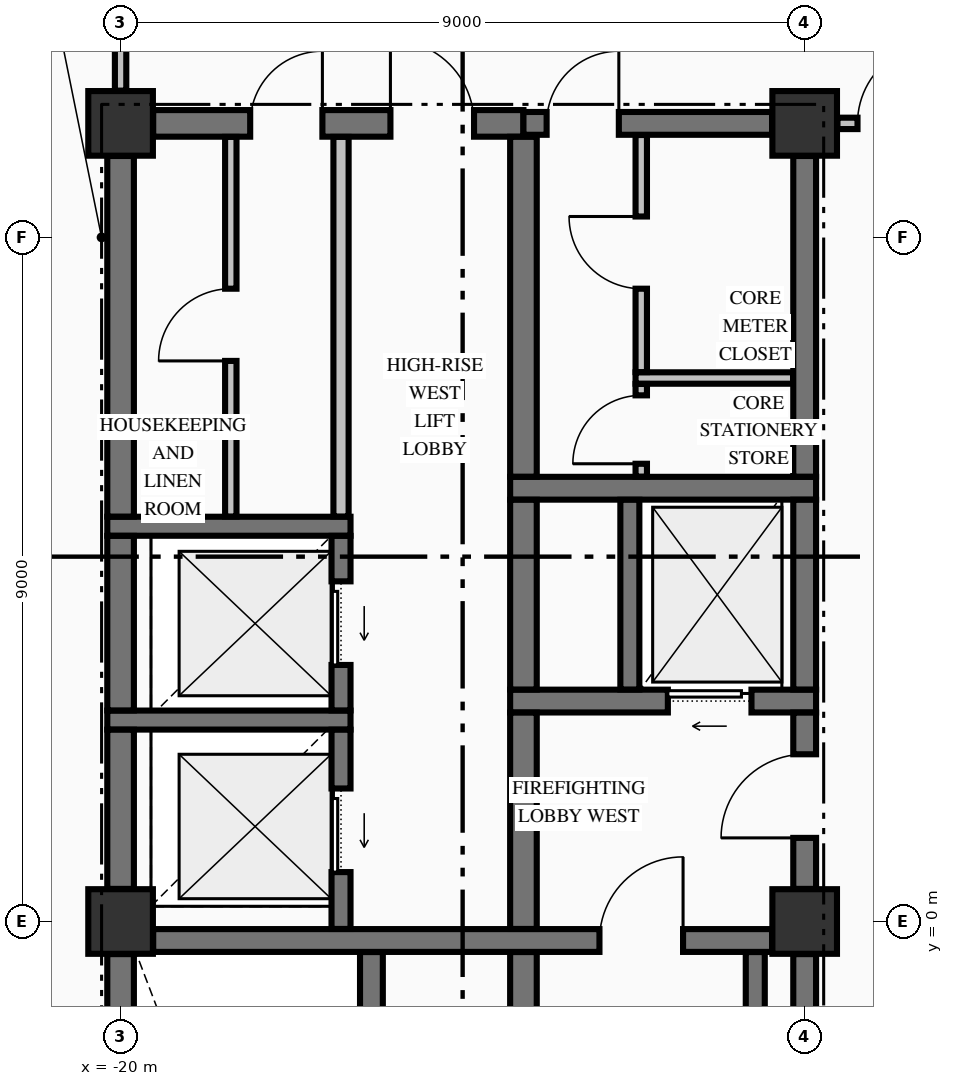
"""IFC4 building model, lengths in metres.
Left out: names, types, materials, properties, quantities, classifications, styles, units other than length and angle.
Written with IfcOpenShell. Run it as: python <this file> out.ifc"""

import sys

from ifc_helpers import new_model, si_unit, direction, frame, frame_2d, origin, origin_2d, place, context, subcontext, project, spatial, rectangle, extrude, element, fill, save


model = new_model("IFC4")
c1 = context("Model", 3, precision=1e-05, world=origin(), true_north=direction((0.0, 1.0)))
c2 = subcontext(c1, "Body", "Model", "MODEL_VIEW")
j1 = project(units=[si_unit("LENGTHUNIT", "METRE"), si_unit("PLANEANGLEUNIT", "RADIAN")], contexts=[c1])
p1 = place(None, origin())
s1 = spatial("IfcSite", under=j1, at=p1, CompositionType="ELEMENT")
p2 = place(p1, origin())
s2 = spatial("IfcBuilding", under=s1, at=p2, CompositionType="ELEMENT")
p3 = place(p2, frame((0.0, 0.0, 162.66)))
s3 = spatial("IfcBuildingStorey", under=s2, at=p3, CompositionType="ELEMENT", Elevation=162.66)
for number, where, z_axis, x_axis in (
    (1, (-20.0, 10.5, -0.25), (0.0, 0.0, 1.0), (1.0, 0.0, 0.0)),
    (2, (-11.0, 0.0, -0.25), (0.0, 0.0, 1.0), (1.0, 0.0, 0.0)),
    (3, (-11.0, 10.5, -0.25), (0.0, 0.0, 1.0), (1.0, 0.0, 0.0)),
    (4, (-20.0, 0.0, -0.25), (0.0, 0.0, 1.0), (1.0, 0.0, 0.0)),
):
    element("IfcColumn", number, at=place(p3, frame(where, z_axis=z_axis, x_axis=x_axis)), inside=s3, PredefinedType="COLUMN", context=c2, shape_type="SweptSolid", body=[
        extrude(rectangle(XDim=0.85, YDim=0.85, at=origin_2d()), origin(), (0.0, 0.0, 1.0), 3.4),
    ])
p4 = place(p3, frame((-19.571, -0.25, 0.0), z_axis=(0.0, 0.0, 1.0), x_axis=(1.0, 0.0, 0.0)))
e5 = element("IfcWall", 5, at=p4, inside=s3, PredefinedType="SHEAR", context=c2, shape_type="SweptSolid", body=[
    extrude(rectangle(XDim=8.142, YDim=0.3, at=frame_2d((4.071, 0.0))), origin(), (0.0, 0.0, 1.0), 3.15),
])
p5 = place(p4, frame((5.871, 0.0, 0.0)))
e6 = element("IfcOpeningElement", 6, at=p5, cuts=e5, PredefinedType="OPENING", context=c2, shape_type="SweptSolid", body=[
    extrude(rectangle(XDim=1.1, YDim=2.15, at=frame_2d((0.55, 1.075))), frame((0.0, 0.16, 0.0), z_axis=(0.0, -1.0, 0.0), x_axis=(1.0, 0.0, 0.0)), (0.0, 0.0, 1.0), 0.32),
])
p6 = place(p3, frame((-20.175, 2.65, 0.0), z_axis=(0.0, 0.0, 1.0), x_axis=(1.0, 0.0, 0.0)))
e7 = element("IfcWall", 7, at=p6, inside=s3, PredefinedType="SOLIDWALL", context=c2, shape_type="SweptSolid", body=[
    extrude(rectangle(XDim=3.2, YDim=0.25, at=frame_2d((1.6, 0.0))), origin(), (0.0, 0.0, 1.0), 3.15),
])
p7 = place(p3, frame((-14.875, 2.9, 0.0), z_axis=(0.0, 0.0, 1.0), x_axis=(1.0, 0.0, 0.0)))
e8 = element("IfcWall", 8, at=p7, inside=s3, PredefinedType="SHEAR", context=c2, shape_type="SweptSolid", body=[
    extrude(rectangle(XDim=4.025, YDim=0.3, at=frame_2d((2.012, 0.0))), origin(), (0.0, 0.0, 1.0), 3.15),
])
p8 = place(p7, frame((2.075, 0.0, 0.0)))
e9 = element("IfcOpeningElement", 9, at=p8, cuts=e8, PredefinedType="OPENING", context=c2, shape_type="SweptSolid", body=[
    extrude(rectangle(XDim=1.1, YDim=2.2, at=frame_2d((0.55, 1.1))), frame((0.0, 0.16, 0.0), z_axis=(0.0, -1.0, 0.0), x_axis=(1.0, 0.0, 0.0)), (0.0, 0.0, 1.0), 0.32),
])
p9 = place(p3, frame((-20.175, 5.2, 0.0), z_axis=(0.0, 0.0, 1.0), x_axis=(1.0, 0.0, 0.0)))
e10 = element("IfcWall", 10, at=p9, inside=s3, PredefinedType="SOLIDWALL", context=c2, shape_type="SweptSolid", body=[
    extrude(rectangle(XDim=3.2, YDim=0.25, at=frame_2d((1.6, 0.0))), origin(), (0.0, 0.0, 1.0), 3.15),
])
p10 = place(p3, frame((-14.875, 5.7, 0.0), z_axis=(0.0, 0.0, 1.0), x_axis=(1.0, 0.0, 0.0)))
e11 = element("IfcWall", 11, at=p10, inside=s3, PredefinedType="SHEAR", context=c2, shape_type="SweptSolid", body=[
    extrude(rectangle(XDim=4.025, YDim=0.3, at=frame_2d((2.012, 0.0))), origin(), (0.0, 0.0, 1.0), 3.15),
])
p11 = place(p3, frame((-19.571, 10.5, 0.0), z_axis=(0.0, 0.0, 1.0), x_axis=(1.0, 0.0, 0.0)))
e12 = element("IfcWall", 12, at=p11, inside=s3, PredefinedType="SHEAR", context=c2, shape_type="SweptSolid", body=[
    extrude(rectangle(XDim=4.871, YDim=0.35, at=frame_2d((2.436, 0.0))), origin(), (0.0, 0.0, 1.0), 3.15),
])
p12 = place(p11, frame((3.121, 0.0, 0.0)))
e13 = element("IfcOpeningElement", 13, at=p12, cuts=e12, PredefinedType="OPENING", context=c2, shape_type="SweptSolid", body=[
    extrude(rectangle(XDim=1.1, YDim=2.15, at=frame_2d((0.55, 1.075))), frame((0.0, 0.185, 0.0), z_axis=(0.0, -1.0, 0.0), x_axis=(1.0, 0.0, 0.0)), (0.0, 0.0, 1.0), 0.37),
])
p13 = place(p11, frame((1.276, 0.0, 0.0)))
e14 = element("IfcOpeningElement", 14, at=p13, cuts=e12, PredefinedType="OPENING", context=c2, shape_type="SweptSolid", body=[
    extrude(rectangle(XDim=0.95, YDim=2.15, at=frame_2d((0.475, 1.075))), frame((0.0, 0.185, 0.0), z_axis=(0.0, -1.0, 0.0), x_axis=(1.0, 0.0, 0.0)), (0.0, 0.0, 1.0), 0.37),
])
p14 = place(p3, frame((-14.7, 10.5, 0.0), z_axis=(0.0, 0.0, 1.0), x_axis=(1.0, 0.0, 0.0)))
e15 = element("IfcWall", 15, at=p14, inside=s3, PredefinedType="SHEAR", context=c2, shape_type="SweptSolid", body=[
    extrude(rectangle(XDim=3.271, YDim=0.3, at=frame_2d((1.635, 0.0))), origin(), (0.0, 0.0, 1.0), 3.15),
])
p15 = place(p14, frame((0.305, 0.0, 0.0)))
e16 = element("IfcOpeningElement", 16, at=p15, cuts=e15, PredefinedType="OPENING", context=c2, shape_type="SweptSolid", body=[
    extrude(rectangle(XDim=0.95, YDim=2.15, at=frame_2d((0.475, 1.075))), frame((0.0, 0.16, 0.0), z_axis=(0.0, -1.0, 0.0), x_axis=(1.0, 0.0, 0.0)), (0.0, 0.0, 1.0), 0.32),
])
p16 = place(p3, frame((-13.225, 7.15, 0.0), z_axis=(0.0, 0.0, 1.0), x_axis=(1.0, 0.0, 0.0)))
e17 = element("IfcWall", 17, at=p16, inside=s3, PredefinedType="PARTITIONING", context=c2, shape_type="SweptSolid", body=[
    extrude(rectangle(XDim=2.072, YDim=0.15, at=frame_2d((1.036, 0.0))), origin(), (0.0, 0.0, 1.0), 3.15),
])
p17 = place(p3, frame((-10.569, 10.5, 0.0), z_axis=(0.0, 0.0, 1.0), x_axis=(1.0, 0.0, 0.0)))
e18 = element("IfcWall", 18, at=p17, inside=s3, PredefinedType="PARTITIONING", context=c2, shape_type="SweptSolid", body=[
    extrude(rectangle(XDim=21.138, YDim=0.15, at=frame_2d((10.569, 0.0))), origin(), (0.0, 0.0, 1.0), 3.15),
])
p18 = place(p17, frame((0.264, 0.0, 0.0)))
e19 = element("IfcOpeningElement", 19, at=p18, cuts=e18, PredefinedType="OPENING", context=c2, shape_type="SweptSolid", body=[
    extrude(rectangle(XDim=1.05, YDim=2.15, at=frame_2d((0.525, 1.075))), frame((0.0, 0.085, 0.0), z_axis=(0.0, -1.0, 0.0), x_axis=(1.0, 0.0, 0.0)), (0.0, 0.0, 1.0), 0.17),
])
p19 = place(p17, frame((19.824, 0.0, 0.0)))
e20 = element("IfcOpeningElement", 20, at=p19, cuts=e18, PredefinedType="OPENING", context=c2, shape_type="SweptSolid", body=[
    extrude(rectangle(XDim=1.05, YDim=2.15, at=frame_2d((0.525, 1.075))), frame((0.0, 0.085, 0.0), z_axis=(0.0, -1.0, 0.0), x_axis=(1.0, 0.0, 0.0)), (0.0, 0.0, 1.0), 0.17),
])
p20 = place(p3, frame((-20.0, -9.521, 0.0), z_axis=(0.0, 0.0, 1.0), x_axis=(0.0, 1.0, 0.0)))
e21 = element("IfcWall", 21, at=p20, inside=s3, PredefinedType="SHEAR", context=c2, shape_type="SweptSolid", body=[
    extrude(rectangle(XDim=9.092, YDim=0.35, at=frame_2d((4.546, 0.0))), origin(), (0.0, 0.0, 1.0), 3.15),
])
p21 = place(p3, frame((-20.0, 0.429, 0.0), z_axis=(0.0, 0.0, 1.0), x_axis=(0.0, 1.0, 0.0)))
e22 = element("IfcWall", 22, at=p21, inside=s3, PredefinedType="SHEAR", context=c2, shape_type="SweptSolid", body=[
    extrude(rectangle(XDim=2.094, YDim=0.35, at=frame_2d((1.047, 0.0))), origin(), (0.0, 0.0, 1.0), 3.15),
])
p22 = place(p3, frame((-20.0, 2.777, 0.0), z_axis=(0.0, 0.0, 1.0), x_axis=(0.0, 1.0, 0.0)))
e23 = element("IfcWall", 23, at=p22, inside=s3, PredefinedType="SHEAR", context=c2, shape_type="SweptSolid", body=[
    extrude(rectangle(XDim=2.296, YDim=0.35, at=frame_2d((1.148, 0.0))), origin(), (0.0, 0.0, 1.0), 3.15),
])
p23 = place(p3, frame((-20.0, 5.327, 0.0), z_axis=(0.0, 0.0, 1.0), x_axis=(0.0, 1.0, 0.0)))
e24 = element("IfcWall", 24, at=p23, inside=s3, PredefinedType="SHEAR", context=c2, shape_type="SweptSolid", body=[
    extrude(rectangle(XDim=4.744, YDim=0.35, at=frame_2d((2.372, 0.0))), origin(), (0.0, 0.0, 1.0), 3.15),
])
p24 = place(p3, frame((-17.1, -0.098, 0.0), z_axis=(0.0, 0.0, 1.0), x_axis=(0.0, 1.0, 0.0)))
e25 = element("IfcWall", 25, at=p24, inside=s3, PredefinedType="SOLIDWALL", context=c2, shape_type="SweptSolid", body=[
    extrude(rectangle(XDim=2.621, YDim=0.25, at=frame_2d((1.311, 0.0))), origin(), (0.0, 0.0, 1.0), 3.15),
])
p25 = place(p24, frame((0.748, 0.0, 0.0)))
e26 = element("IfcOpeningElement", 26, at=p25, cuts=e25, PredefinedType="OPENING", context=c2, shape_type="SweptSolid", body=[
    extrude(rectangle(XDim=1.1, YDim=2.2, at=frame_2d((0.55, 1.1))), frame((0.0, 0.135, 0.0), z_axis=(0.0, -1.0, 0.0), x_axis=(1.0, 0.0, 0.0)), (0.0, 0.0, 1.0), 0.27),
])
p26 = place(p3, frame((-17.1, 2.777, 0.0), z_axis=(0.0, 0.0, 1.0), x_axis=(0.0, 1.0, 0.0)))
e27 = element("IfcWall", 27, at=p26, inside=s3, PredefinedType="SOLIDWALL", context=c2, shape_type="SweptSolid", body=[
    extrude(rectangle(XDim=2.296, YDim=0.25, at=frame_2d((1.148, 0.0))), origin(), (0.0, 0.0, 1.0), 3.15),
])
p27 = place(p26, frame((0.598, 0.0, 0.0)))
e28 = element("IfcOpeningElement", 28, at=p27, cuts=e27, PredefinedType="OPENING", context=c2, shape_type="SweptSolid", body=[
    extrude(rectangle(XDim=1.1, YDim=2.2, at=frame_2d((0.55, 1.1))), frame((0.0, 0.135, 0.0), z_axis=(0.0, -1.0, 0.0), x_axis=(1.0, 0.0, 0.0)), (0.0, 0.0, 1.0), 0.27),
])
p28 = place(p3, frame((-16.7, -9.773, 0.0), z_axis=(0.0, 0.0, 1.0), x_axis=(0.0, 1.0, 0.0)))
e29 = element("IfcWall", 29, at=p28, inside=s3, PredefinedType="SHEAR", context=c2, shape_type="SweptSolid", body=[
    extrude(rectangle(XDim=9.371, YDim=0.3, at=frame_2d((4.686, 0.0))), origin(), (0.0, 0.0, 1.0), 3.15),
])
p29 = place(p3, frame((-14.7, -9.773, 0.0), z_axis=(0.0, 0.0, 1.0), x_axis=(0.0, 1.0, 0.0)))
e30 = element("IfcWall", 30, at=p29, inside=s3, PredefinedType="SHEAR", context=c2, shape_type="SweptSolid", body=[
    extrude(rectangle(XDim=9.371, YDim=0.35, at=frame_2d((4.686, 0.0))), origin(), (0.0, 0.0, 1.0), 3.15),
])
p30 = place(p3, frame((-14.7, -0.098, 0.0), z_axis=(0.0, 0.0, 1.0), x_axis=(0.0, 1.0, 0.0)))
e31 = element("IfcWall", 31, at=p30, inside=s3, PredefinedType="SHEAR", context=c2, shape_type="SweptSolid", body=[
    extrude(rectangle(XDim=2.846, YDim=0.35, at=frame_2d((1.423, 0.0))), origin(), (0.0, 0.0, 1.0), 3.15),
])
p31 = place(p3, frame((-14.7, 3.052, 0.0), z_axis=(0.0, 0.0, 1.0), x_axis=(0.0, 1.0, 0.0)))
e32 = element("IfcWall", 32, at=p31, inside=s3, PredefinedType="SHEAR", context=c2, shape_type="SweptSolid", body=[
    extrude(rectangle(XDim=2.496, YDim=0.35, at=frame_2d((1.248, 0.0))), origin(), (0.0, 0.0, 1.0), 3.15),
])
p32 = place(p3, frame((-14.7, 5.852, 0.0), z_axis=(0.0, 0.0, 1.0), x_axis=(0.0, 1.0, 0.0)))
e33 = element("IfcWall", 33, at=p32, inside=s3, PredefinedType="SHEAR", context=c2, shape_type="SweptSolid", body=[
    extrude(rectangle(XDim=4.471, YDim=0.35, at=frame_2d((2.235, 0.0))), origin(), (0.0, 0.0, 1.0), 3.15),
])
p33 = place(p3, frame((-13.3, 3.052, 0.0), z_axis=(0.0, 0.0, 1.0), x_axis=(0.0, 1.0, 0.0)))
e34 = element("IfcWall", 34, at=p33, inside=s3, PredefinedType="SOLIDWALL", context=c2, shape_type="SweptSolid", body=[
    extrude(rectangle(XDim=2.496, YDim=0.25, at=frame_2d((1.248, 0.0))), origin(), (0.0, 0.0, 1.0), 3.15),
])
p34 = place(p3, frame((-11.65, -9.798, 0.0), z_axis=(0.0, 0.0, 1.0), x_axis=(0.0, 1.0, 0.0)))
e35 = element("IfcWall", 35, at=p34, inside=s3, PredefinedType="SOLIDWALL", context=c2, shape_type="SweptSolid", body=[
    extrude(rectangle(XDim=9.396, YDim=0.25, at=frame_2d((4.698, 0.0))), origin(), (0.0, 0.0, 1.0), 3.15),
])
p35 = place(p3, frame((-11.0, -9.521, 0.0), z_axis=(0.0, 0.0, 1.0), x_axis=(0.0, 1.0, 0.0)))
e36 = element("IfcWall", 36, at=p35, inside=s3, PredefinedType="SHEAR", context=c2, shape_type="SweptSolid", body=[
    extrude(rectangle(XDim=9.092, YDim=0.3, at=frame_2d((4.546, 0.0))), origin(), (0.0, 0.0, 1.0), 3.15),
])
p36 = place(p3, frame((-11.0, 0.429, 0.0), z_axis=(0.0, 0.0, 1.0), x_axis=(0.0, 1.0, 0.0)))
e37 = element("IfcWall", 37, at=p36, inside=s3, PredefinedType="SHEAR", context=c2, shape_type="SweptSolid", body=[
    extrude(rectangle(XDim=2.319, YDim=0.3, at=frame_2d((1.16, 0.0))), origin(), (0.0, 0.0, 1.0), 3.15),
])
p37 = place(p36, frame((0.671, 0.0, 0.0)))
e38 = element("IfcOpeningElement", 38, at=p37, cuts=e37, PredefinedType="OPENING", context=c2, shape_type="SweptSolid", body=[
    extrude(rectangle(XDim=1.1, YDim=2.15, at=frame_2d((0.55, 1.075))), frame((0.0, 0.16, 0.0), z_axis=(0.0, -1.0, 0.0), x_axis=(1.0, 0.0, 0.0)), (0.0, 0.0, 1.0), 0.32),
])
p38 = place(p3, frame((-11.0, 3.052, 0.0), z_axis=(0.0, 0.0, 1.0), x_axis=(0.0, 1.0, 0.0)))
e39 = element("IfcWall", 39, at=p38, inside=s3, PredefinedType="SHEAR", context=c2, shape_type="SweptSolid", body=[
    extrude(rectangle(XDim=2.496, YDim=0.3, at=frame_2d((1.248, 0.0))), origin(), (0.0, 0.0, 1.0), 3.15),
])
p39 = place(p3, frame((-11.0, 5.852, 0.0), z_axis=(0.0, 0.0, 1.0), x_axis=(0.0, 1.0, 0.0)))
e40 = element("IfcWall", 40, at=p39, inside=s3, PredefinedType="SHEAR", context=c2, shape_type="SweptSolid", body=[
    extrude(rectangle(XDim=4.219, YDim=0.3, at=frame_2d((2.109, 0.0))), origin(), (0.0, 0.0, 1.0), 3.15),
])
p40 = place(p3, frame((-20.0, 10.931, 0.0), z_axis=(0.0, 0.0, 1.0), x_axis=(0.0, 1.0, 0.0)))
e41 = element("IfcWall", 41, at=p40, inside=s3, PredefinedType="PARTITIONING", context=c2, shape_type="SweptSolid", body=[
    extrude(rectangle(XDim=1.941, YDim=0.15, at=frame_2d((0.971, 0.0))), origin(), (0.0, 0.0, 1.0), 2.342),
])
p41 = place(p3, frame((-18.55, 5.328, 0.0), z_axis=(0.0, 0.0, 1.0), x_axis=(0.0, 1.0, 0.0)))
e42 = element("IfcWall", 42, at=p41, inside=s3, PredefinedType="PARTITIONING", context=c2, shape_type="SweptSolid", body=[
    extrude(rectangle(XDim=4.994, YDim=0.15, at=frame_2d((2.497, 0.0))), origin(), (0.0, 0.0, 1.0), 3.15),
])
p42 = place(p41, frame((2.047, 0.0, 0.0)))
e43 = element("IfcOpeningElement", 43, at=p42, cuts=e42, PredefinedType="OPENING", context=c2, shape_type="SweptSolid", body=[
    extrude(rectangle(XDim=0.95, YDim=2.15, at=frame_2d((0.475, 1.075))), frame((0.0, 0.085, 0.0), z_axis=(0.0, -1.0, 0.0), x_axis=(1.0, 0.0, 0.0)), (0.0, 0.0, 1.0), 0.17),
])
p43 = place(p3, frame((-17.1, 5.328, 0.0), z_axis=(0.0, 0.0, 1.0), x_axis=(0.0, 1.0, 0.0)))
e44 = element("IfcWall", 44, at=p43, inside=s3, PredefinedType="PARTITIONING", context=c2, shape_type="SweptSolid", body=[
    extrude(rectangle(XDim=4.994, YDim=0.2, at=frame_2d((2.497, 0.0))), origin(), (0.0, 0.0, 1.0), 3.15),
])
p44 = place(p3, frame((-13.15, 5.853, 0.0), z_axis=(0.0, 0.0, 1.0), x_axis=(0.0, 1.0, 0.0)))
e45 = element("IfcWall", 45, at=p44, inside=s3, PredefinedType="PARTITIONING", context=c2, shape_type="SweptSolid", body=[
    extrude(rectangle(XDim=1.219, YDim=0.15, at=frame_2d((0.609, 0.0))), origin(), (0.0, 0.0, 1.0), 3.15),
])
p45 = place(p44, frame((0.169, 0.0, 0.0)))
e46 = element("IfcOpeningElement", 46, at=p45, cuts=e45, PredefinedType="OPENING", context=c2, shape_type="SweptSolid", body=[
    extrude(rectangle(XDim=0.9, YDim=2.15, at=frame_2d((0.45, 1.075))), frame((0.0, 0.085, 0.0), z_axis=(0.0, -1.0, 0.0), x_axis=(1.0, 0.0, 0.0)), (0.0, 0.0, 1.0), 0.17),
])
p46 = place(p3, frame((-13.15, 7.228, 0.0), z_axis=(0.0, 0.0, 1.0), x_axis=(0.0, 1.0, 0.0)))
e47 = element("IfcWall", 47, at=p46, inside=s3, PredefinedType="PARTITIONING", context=c2, shape_type="SweptSolid", body=[
    extrude(rectangle(XDim=3.119, YDim=0.15, at=frame_2d((1.56, 0.0))), origin(), (0.0, 0.0, 1.0), 3.15),
])
p47 = place(p46, frame((1.097, 0.0, 0.0)))
e48 = element("IfcOpeningElement", 48, at=p47, cuts=e47, PredefinedType="OPENING", context=c2, shape_type="SweptSolid", body=[
    extrude(rectangle(XDim=0.95, YDim=2.15, at=frame_2d((0.475, 1.075))), frame((0.0, 0.085, 0.0), z_axis=(0.0, -1.0, 0.0), x_axis=(1.0, 0.0, 0.0)), (0.0, 0.0, 1.0), 0.17),
])
p48 = place(p5, origin())
e49 = element("IfcDoor", 49, at=p48, inside=s3, OperationType="SINGLE_SWING_RIGHT", PredefinedType="DOOR", context=c2, shape_type="SweptSolid", body=[
    extrude(rectangle(XDim=1.1, YDim=2.15, at=frame_2d((0.55, 1.075))), frame((0.0, 0.025, 0.0), z_axis=(0.0, -1.0, 0.0), x_axis=(1.0, 0.0, 0.0)), (0.0, 0.0, 1.0), 0.05),
])
fill(e6, e49)
p49 = place(p37, origin())
e50 = element("IfcDoor", 50, at=p49, inside=s3, OperationType="SINGLE_SWING_LEFT", PredefinedType="DOOR", context=c2, shape_type="SweptSolid", body=[
    extrude(rectangle(XDim=1.1, YDim=2.15, at=frame_2d((0.55, 1.075))), frame((0.0, 0.025, 0.0), z_axis=(0.0, -1.0, 0.0), x_axis=(1.0, 0.0, 0.0)), (0.0, 0.0, 1.0), 0.05),
])
fill(e38, e50)
p50 = place(p8, origin())
e51 = element("IfcDoor", 51, at=p50, inside=s3, OperationType="SLIDING_TO_LEFT", PredefinedType="DOOR", context=c2, shape_type="SweptSolid", body=[
    extrude(rectangle(XDim=1.1, YDim=2.2, at=frame_2d((0.55, 1.1))), frame((0.0, 0.025, 0.0), z_axis=(0.0, -1.0, 0.0), x_axis=(1.0, 0.0, 0.0)), (0.0, 0.0, 1.0), 0.05),
])
fill(e9, e51)
p51 = place(p15, origin())
e52 = element("IfcDoor", 52, at=p51, inside=s3, OperationType="SINGLE_SWING_RIGHT", PredefinedType="DOOR", context=c2, shape_type="SweptSolid", body=[
    extrude(rectangle(XDim=0.95, YDim=2.15, at=frame_2d((0.475, 1.075))), frame((0.0, 0.025, 0.0), z_axis=(0.0, -1.0, 0.0), x_axis=(1.0, 0.0, 0.0)), (0.0, 0.0, 1.0), 0.05),
])
fill(e16, e52)
p52 = place(p45, origin())
e53 = element("IfcDoor", 53, at=p52, inside=s3, OperationType="SINGLE_SWING_LEFT", PredefinedType="DOOR", context=c2, shape_type="SweptSolid", body=[
    extrude(rectangle(XDim=0.9, YDim=2.15, at=frame_2d((0.45, 1.075))), frame((0.0, 0.025, 0.0), z_axis=(0.0, -1.0, 0.0), x_axis=(1.0, 0.0, 0.0)), (0.0, 0.0, 1.0), 0.05),
])
fill(e46, e53)
p53 = place(p47, origin())
e54 = element("IfcDoor", 54, at=p53, inside=s3, OperationType="SINGLE_SWING_RIGHT", PredefinedType="DOOR", context=c2, shape_type="SweptSolid", body=[
    extrude(rectangle(XDim=0.95, YDim=2.15, at=frame_2d((0.475, 1.075))), frame((0.0, 0.025, 0.0), z_axis=(0.0, -1.0, 0.0), x_axis=(1.0, 0.0, 0.0)), (0.0, 0.0, 1.0), 0.05),
])
fill(e48, e54)
p54 = place(p25, origin())
e55 = element("IfcDoor", 55, at=p54, inside=s3, OperationType="SLIDING_TO_LEFT", PredefinedType="DOOR", context=c2, shape_type="SweptSolid", body=[
    extrude(rectangle(XDim=1.1, YDim=2.2, at=frame_2d((0.55, 1.1))), frame((0.0, 0.025, 0.0), z_axis=(0.0, -1.0, 0.0), x_axis=(1.0, 0.0, 0.0)), (0.0, 0.0, 1.0), 0.05),
])
fill(e26, e55)
p55 = place(p27, origin())
e56 = element("IfcDoor", 56, at=p55, inside=s3, OperationType="SLIDING_TO_LEFT", PredefinedType="DOOR", context=c2, shape_type="SweptSolid", body=[
    extrude(rectangle(XDim=1.1, YDim=2.2, at=frame_2d((0.55, 1.1))), frame((0.0, 0.025, 0.0), z_axis=(0.0, -1.0, 0.0), x_axis=(1.0, 0.0, 0.0)), (0.0, 0.0, 1.0), 0.05),
])
fill(e28, e56)
p56 = place(p12, origin())
e57 = element("IfcDoor", 57, at=p56, inside=s3, OperationType="SINGLE_SWING_LEFT", PredefinedType="DOOR", context=c2, shape_type="SweptSolid", body=[
    extrude(rectangle(XDim=1.1, YDim=2.15, at=frame_2d((0.55, 1.075))), frame((0.0, 0.025, 0.0), z_axis=(0.0, -1.0, 0.0), x_axis=(1.0, 0.0, 0.0)), (0.0, 0.0, 1.0), 0.05),
])
fill(e13, e57)
p57 = place(p13, origin())
e58 = element("IfcDoor", 58, at=p57, inside=s3, OperationType="SINGLE_SWING_RIGHT", PredefinedType="DOOR", context=c2, shape_type="SweptSolid", body=[
    extrude(rectangle(XDim=0.95, YDim=2.15, at=frame_2d((0.475, 1.075))), frame((0.0, 0.025, 0.0), z_axis=(0.0, -1.0, 0.0), x_axis=(1.0, 0.0, 0.0)), (0.0, 0.0, 1.0), 0.05),
])
fill(e14, e58)
p58 = place(p42, origin())
e59 = element("IfcDoor", 59, at=p58, inside=s3, OperationType="SINGLE_SWING_LEFT", PredefinedType="DOOR", context=c2, shape_type="SweptSolid", body=[
    extrude(rectangle(XDim=0.95, YDim=2.15, at=frame_2d((0.475, 1.075))), frame((0.0, 0.025, 0.0), z_axis=(0.0, -1.0, 0.0), x_axis=(1.0, 0.0, 0.0)), (0.0, 0.0, 1.0), 0.05),
])
fill(e43, e59)
p59 = place(p18, origin())
e60 = element("IfcDoor", 60, at=p59, inside=s3, OperationType="SINGLE_SWING_RIGHT", PredefinedType="DOOR", context=c2, shape_type="SweptSolid", body=[
    extrude(rectangle(XDim=1.05, YDim=2.15, at=frame_2d((0.525, 1.075))), frame((0.0, 0.025, 0.0), z_axis=(0.0, -1.0, 0.0), x_axis=(1.0, 0.0, 0.0)), (0.0, 0.0, 1.0), 0.05),
])
fill(e19, e60)
save(model, sys.argv[1])
